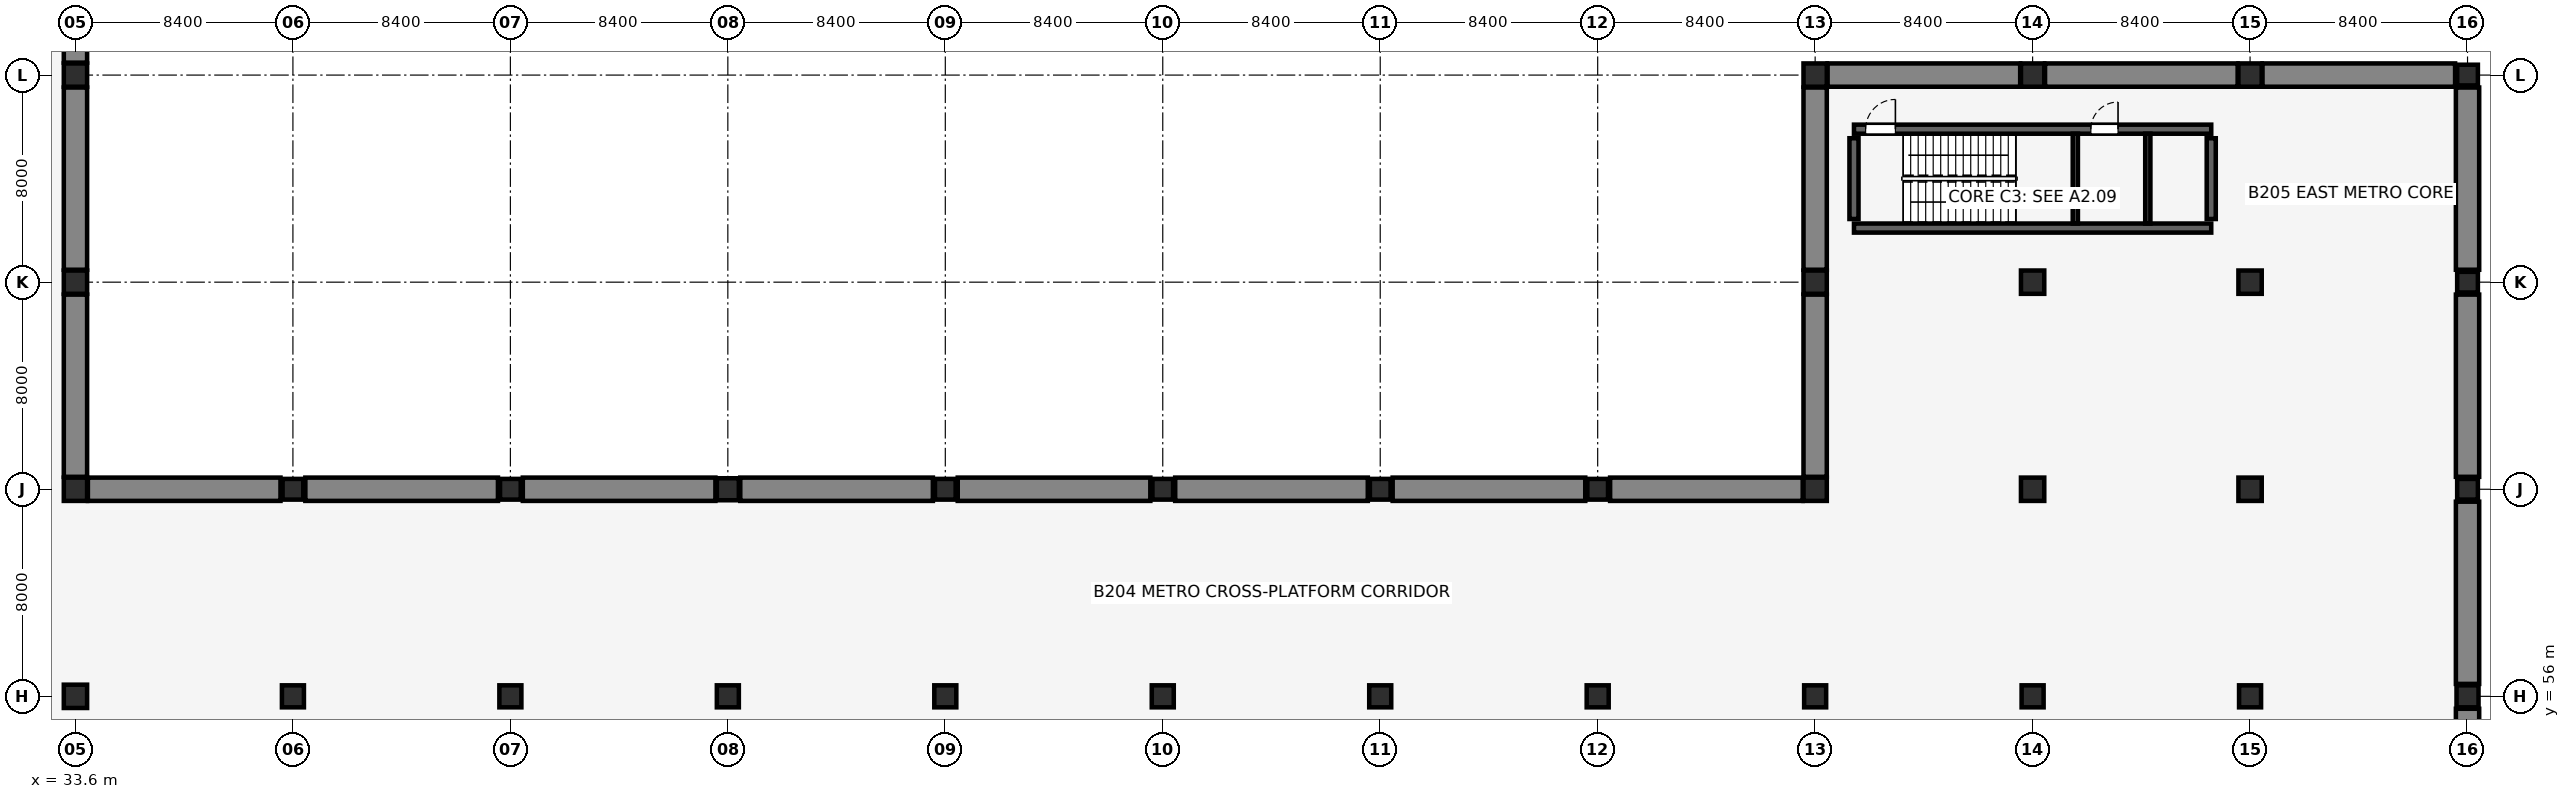
"""IFC4 building model, lengths in metres.
Left out: names, types, materials, properties, quantities, classifications, styles, units other than length and angle.
Written with IfcOpenShell. Run it as: python <this file> out.ifc"""

import sys

from ifc_helpers import new_model, si_unit, direction, frame, frame_2d, origin, origin_2d, place, context, subcontext, project, spatial, rectangle, extrude, element, fill, save


model = new_model("IFC4")
c1 = context("Model", 3, precision=1e-05, world=origin(), true_north=direction((0.0, 1.0)))
c2 = subcontext(c1, "Body", "Model", "MODEL_VIEW")
j1 = project(units=[si_unit("LENGTHUNIT", "METRE"), si_unit("PLANEANGLEUNIT", "RADIAN")], contexts=[c1])
p1 = place(None, origin())
s1 = spatial("IfcSite", under=j1, at=p1, CompositionType="ELEMENT")
p2 = place(p1, origin())
s2 = spatial("IfcBuilding", under=s1, at=p2, CompositionType="ELEMENT")
p3 = place(p2, frame((0.0, 0.0, -10.88)))
s3 = spatial("IfcBuildingStorey", under=s2, at=p3, CompositionType="ELEMENT", Elevation=-10.88)
for number, where, z_axis, x_axis in (
    (1, (33.6, 64.48, 0.0), (0.0, 0.0, 1.0), (0.0, 1.0, 0.0)),
    (2, (33.6, 72.48, 0.0), (0.0, 0.0, 1.0), (0.0, 1.0, 0.0)),
    (3, (33.6, 80.48, 0.0), (0.0, 0.0, 1.0), (0.0, 1.0, 0.0)),
):
    element("IfcWall", number, at=place(p3, frame(where, z_axis=z_axis, x_axis=x_axis)), inside=s3, PredefinedType="SHEAR", context=c2, shape_type="SweptSolid", body=[
        extrude(rectangle(XDim=7.04, YDim=0.9, at=frame_2d((3.52, 0.0))), origin(), (0.0, 0.0, 1.0), 5.04),
    ])
for number, where, z_axis, x_axis in (
    (4, (34.08, 64.0, 0.0), (0.0, 0.0, 1.0), (1.0, 0.0, 0.0)),
    (5, (42.48, 64.0, 0.0), (0.0, 0.0, 1.0), (1.0, 0.0, 0.0)),
):
    element("IfcWall", number, at=place(p3, frame(where, z_axis=z_axis, x_axis=x_axis)), inside=s3, PredefinedType="SHEAR", context=c2, shape_type="SweptSolid", body=[
        extrude(rectangle(XDim=7.44, YDim=0.9, at=frame_2d((3.72, 0.0))), origin(), (0.0, 0.0, 1.0), 5.04),
    ])
p4 = place(p3, frame((50.88, 64.0, 0.0), z_axis=(0.0, 0.0, 1.0), x_axis=(1.0, 0.0, 0.0)))
e6 = element("IfcWall", 6, at=p4, inside=s3, PredefinedType="SHEAR", context=c2, shape_type="SweptSolid", body=[
    extrude(rectangle(XDim=7.44, YDim=0.9, at=frame_2d((3.72, 0.0))), origin(), (0.0, 0.0, 1.0), 5.04),
])
p5 = place(p3, frame((59.28, 64.0, 0.0), z_axis=(0.0, 0.0, 1.0), x_axis=(1.0, 0.0, 0.0)))
e7 = element("IfcWall", 7, at=p5, inside=s3, PredefinedType="SHEAR", context=c2, shape_type="SweptSolid", body=[
    extrude(rectangle(XDim=7.44, YDim=0.9, at=frame_2d((3.72, 0.0))), origin(), (0.0, 0.0, 1.0), 5.04),
])
p6 = place(p3, frame((67.68, 64.0, 0.0), z_axis=(0.0, 0.0, 1.0), x_axis=(1.0, 0.0, 0.0)))
e8 = element("IfcWall", 8, at=p6, inside=s3, PredefinedType="SHEAR", context=c2, shape_type="SweptSolid", body=[
    extrude(rectangle(XDim=7.44, YDim=0.9, at=frame_2d((3.72, 0.0))), origin(), (0.0, 0.0, 1.0), 5.04),
])
for number, where, z_axis, x_axis in (
    (9, (76.08, 64.0, 0.0), (0.0, 0.0, 1.0), (1.0, 0.0, 0.0)),
    (10, (84.48, 64.0, 0.0), (0.0, 0.0, 1.0), (1.0, 0.0, 0.0)),
):
    element("IfcWall", number, at=place(p3, frame(where, z_axis=z_axis, x_axis=x_axis)), inside=s3, PredefinedType="SHEAR", context=c2, shape_type="SweptSolid", body=[
        extrude(rectangle(XDim=7.44, YDim=0.9, at=frame_2d((3.72, 0.0))), origin(), (0.0, 0.0, 1.0), 5.04),
    ])
p7 = place(p3, frame((92.88, 64.0, 0.0), z_axis=(0.0, 0.0, 1.0), x_axis=(1.0, 0.0, 0.0)))
e11 = element("IfcWall", 11, at=p7, inside=s3, PredefinedType="SHEAR", context=c2, shape_type="SweptSolid", body=[
    extrude(rectangle(XDim=7.44, YDim=0.9, at=frame_2d((3.72, 0.0))), origin(), (0.0, 0.0, 1.0), 5.04),
])
for number, where, z_axis, x_axis in (
    (12, (100.8, 64.48, 0.0), (0.0, 0.0, 1.0), (0.0, 1.0, 0.0)),
    (13, (100.8, 72.48, 0.0), (0.0, 0.0, 1.0), (0.0, 1.0, 0.0)),
):
    element("IfcWall", number, at=place(p3, frame(where, z_axis=z_axis, x_axis=x_axis)), inside=s3, PredefinedType="SHEAR", context=c2, shape_type="SweptSolid", body=[
        extrude(rectangle(XDim=7.04, YDim=0.9, at=frame_2d((3.52, 0.0))), origin(), (0.0, 0.0, 1.0), 5.04),
    ])
p8 = place(p3, frame((101.28, 80.0, 0.0), z_axis=(0.0, 0.0, 1.0), x_axis=(1.0, 0.0, 0.0)))
e14 = element("IfcWall", 14, at=p8, inside=s3, PredefinedType="SHEAR", context=c2, shape_type="SweptSolid", body=[
    extrude(rectangle(XDim=7.44, YDim=0.9, at=frame_2d((3.72, 0.0))), origin(), (0.0, 0.0, 1.0), 5.04),
])
p9 = place(p3, frame((109.68, 80.0, 0.0), z_axis=(0.0, 0.0, 1.0), x_axis=(1.0, 0.0, 0.0)))
e15 = element("IfcWall", 15, at=p9, inside=s3, PredefinedType="SHEAR", context=c2, shape_type="SweptSolid", body=[
    extrude(rectangle(XDim=7.44, YDim=0.9, at=frame_2d((3.72, 0.0))), origin(), (0.0, 0.0, 1.0), 5.04),
])
p10 = place(p3, frame((118.08, 80.0, 0.0), z_axis=(0.0, 0.0, 1.0), x_axis=(1.0, 0.0, 0.0)))
e16 = element("IfcWall", 16, at=p10, inside=s3, PredefinedType="SHEAR", context=c2, shape_type="SweptSolid", body=[
    extrude(rectangle(XDim=7.44, YDim=0.9, at=frame_2d((3.72, 0.0))), origin(), (0.0, 0.0, 1.0), 5.04),
])
for number, where, z_axis, x_axis in (
    (17, (126.0, 64.48, 0.0), (0.0, 0.0, 1.0), (0.0, 1.0, 0.0)),
    (18, (126.0, 72.48, 0.0), (0.0, 0.0, 1.0), (0.0, 1.0, 0.0)),
    (19, (126.0, 48.48, 0.0), (0.0, 0.0, 1.0), (0.0, 1.0, 0.0)),
    (20, (126.0, 56.48, 0.0), (0.0, 0.0, 1.0), (0.0, 1.0, 0.0)),
):
    element("IfcWall", number, at=place(p3, frame(where, z_axis=z_axis, x_axis=x_axis)), inside=s3, PredefinedType="SHEAR", context=c2, shape_type="SweptSolid", body=[
        extrude(rectangle(XDim=7.04, YDim=0.9, at=frame_2d((3.52, 0.0))), origin(), (0.0, 0.0, 1.0), 5.04),
    ])
p11 = place(p3, frame((102.3, 74.09, 0.0), z_axis=(0.0, 0.0, 1.0), x_axis=(1.0, 0.0, 0.0)))
e21 = element("IfcWall", 21, at=p11, inside=s3, PredefinedType="SHEAR", context=c2, shape_type="SweptSolid", body=[
    extrude(rectangle(XDim=13.8, YDim=0.35, at=frame_2d((6.9, 0.0))), origin(), (0.0, 0.0, 1.0), 5.04),
])
p12 = place(p3, frame((102.3, 77.91, 0.0), z_axis=(0.0, 0.0, 1.0), x_axis=(1.0, 0.0, 0.0)))
e22 = element("IfcWall", 22, at=p12, inside=s3, PredefinedType="SHEAR", context=c2, shape_type="SweptSolid", body=[
    extrude(rectangle(XDim=13.8, YDim=0.35, at=frame_2d((6.9, 0.0))), origin(), (0.0, 0.0, 1.0), 5.04),
])
p13 = place(p12, frame((0.45, 0.0, 0.0), z_axis=(0.0, 0.0, 1.0), x_axis=(1.0, 0.0, 0.0)))
e23 = element("IfcOpeningElement", 23, at=p13, cuts=e22, PredefinedType="OPENING", context=c2, shape_type="SweptSolid", body=[
    extrude(rectangle(XDim=1.15, YDim=2.15, at=frame_2d((0.575, 1.075))), frame((0.0, 0.185, 0.0), z_axis=(0.0, -1.0, 0.0), x_axis=(1.0, 0.0, 0.0)), (0.0, 0.0, 1.0), 0.37),
])
p14 = place(p12, frame((9.15, 0.0, 0.0), z_axis=(0.0, 0.0, 1.0), x_axis=(1.0, 0.0, 0.0)))
e24 = element("IfcOpeningElement", 24, at=p14, cuts=e22, PredefinedType="OPENING", context=c2, shape_type="SweptSolid", body=[
    extrude(rectangle(XDim=1.05, YDim=2.15, at=frame_2d((0.525, 1.075))), frame((0.0, 0.185, 0.0), z_axis=(0.0, -1.0, 0.0), x_axis=(1.0, 0.0, 0.0)), (0.0, 0.0, 1.0), 0.37),
])
for number, where, z_axis, x_axis in (
    (25, (102.3, 74.44, 0.0), (0.0, 0.0, 1.0), (0.0, 1.0, 0.0)),
    (26, (116.1, 74.44, 0.0), (0.0, 0.0, 1.0), (0.0, 1.0, 0.0)),
):
    element("IfcWall", number, at=place(p3, frame(where, z_axis=z_axis, x_axis=x_axis)), inside=s3, PredefinedType="SHEAR", context=c2, shape_type="SweptSolid", body=[
        extrude(rectangle(XDim=3.12, YDim=0.35, at=frame_2d((1.56, 0.0))), origin(), (0.0, 0.0, 1.0), 5.04),
    ])
for number, where, z_axis, x_axis in (
    (27, (33.6, 56.0, 0.0), (0.0, 0.0, 1.0), (1.0, 0.0, 0.0)),
    (28, (33.6, 64.0, 0.0), (0.0, 0.0, 1.0), (1.0, 0.0, 0.0)),
    (29, (33.6, 72.0, 0.0), (0.0, 0.0, 1.0), (1.0, 0.0, 0.0)),
    (30, (33.6, 80.0, 0.0), (0.0, 0.0, 1.0), (1.0, 0.0, 0.0)),
):
    element("IfcColumn", number, at=place(p3, frame(where, z_axis=z_axis, x_axis=x_axis)), inside=s3, PredefinedType="COLUMN", context=c2, shape_type="SweptSolid", body=[
        extrude(rectangle(XDim=0.9, YDim=0.9, at=origin_2d()), origin(), (0.0, 0.0, 1.0), 5.04),
    ])
p15 = place(p3, frame((42.0, 56.0, 0.0), z_axis=(0.0, 0.0, 1.0), x_axis=(1.0, 0.0, 0.0)))
e31 = element("IfcColumn", 31, at=p15, inside=s3, PredefinedType="COLUMN", context=c2, shape_type="SweptSolid", body=[
    extrude(rectangle(XDim=0.85, YDim=0.85, at=origin_2d()), origin(), (0.0, 0.0, 1.0), 5.04),
])
p16 = place(p3, frame((42.0, 64.0, 0.0), z_axis=(0.0, 0.0, 1.0), x_axis=(1.0, 0.0, 0.0)))
e32 = element("IfcColumn", 32, at=p16, inside=s3, PredefinedType="COLUMN", context=c2, shape_type="SweptSolid", body=[
    extrude(rectangle(XDim=0.8, YDim=0.8, at=origin_2d()), origin(), (0.0, 0.0, 1.0), 5.04),
])
p17 = place(p3, frame((50.4, 56.0, 0.0), z_axis=(0.0, 0.0, 1.0), x_axis=(1.0, 0.0, 0.0)))
e33 = element("IfcColumn", 33, at=p17, inside=s3, PredefinedType="COLUMN", context=c2, shape_type="SweptSolid", body=[
    extrude(rectangle(XDim=0.85, YDim=0.85, at=origin_2d()), origin(), (0.0, 0.0, 1.0), 5.04),
])
p18 = place(p3, frame((50.4, 64.0, 0.0), z_axis=(0.0, 0.0, 1.0), x_axis=(1.0, 0.0, 0.0)))
e34 = element("IfcColumn", 34, at=p18, inside=s3, PredefinedType="COLUMN", context=c2, shape_type="SweptSolid", body=[
    extrude(rectangle(XDim=0.8, YDim=0.8, at=origin_2d()), origin(), (0.0, 0.0, 1.0), 5.04),
])
for number, where, z_axis, x_axis in (
    (35, (58.8, 56.0, 0.0), (0.0, 0.0, 1.0), (1.0, 0.0, 0.0)),
    (36, (58.8, 64.0, 0.0), (0.0, 0.0, 1.0), (1.0, 0.0, 0.0)),
    (37, (67.2, 56.0, 0.0), (0.0, 0.0, 1.0), (1.0, 0.0, 0.0)),
):
    element("IfcColumn", number, at=place(p3, frame(where, z_axis=z_axis, x_axis=x_axis)), inside=s3, PredefinedType="COLUMN", context=c2, shape_type="SweptSolid", body=[
        extrude(rectangle(XDim=0.85, YDim=0.85, at=origin_2d()), origin(), (0.0, 0.0, 1.0), 5.04),
    ])
p19 = place(p3, frame((67.2, 64.0, 0.0), z_axis=(0.0, 0.0, 1.0), x_axis=(1.0, 0.0, 0.0)))
e38 = element("IfcColumn", 38, at=p19, inside=s3, PredefinedType="COLUMN", context=c2, shape_type="SweptSolid", body=[
    extrude(rectangle(XDim=0.8, YDim=0.8, at=origin_2d()), origin(), (0.0, 0.0, 1.0), 5.04),
])
p20 = place(p3, frame((75.6, 56.0, 0.0), z_axis=(0.0, 0.0, 1.0), x_axis=(1.0, 0.0, 0.0)))
e39 = element("IfcColumn", 39, at=p20, inside=s3, PredefinedType="COLUMN", context=c2, shape_type="SweptSolid", body=[
    extrude(rectangle(XDim=0.85, YDim=0.85, at=origin_2d()), origin(), (0.0, 0.0, 1.0), 5.04),
])
p21 = place(p3, frame((75.6, 64.0, 0.0), z_axis=(0.0, 0.0, 1.0), x_axis=(1.0, 0.0, 0.0)))
e40 = element("IfcColumn", 40, at=p21, inside=s3, PredefinedType="COLUMN", context=c2, shape_type="SweptSolid", body=[
    extrude(rectangle(XDim=0.8, YDim=0.8, at=origin_2d()), origin(), (0.0, 0.0, 1.0), 5.04),
])
p22 = place(p3, frame((84.0, 56.0, 0.0), z_axis=(0.0, 0.0, 1.0), x_axis=(1.0, 0.0, 0.0)))
e41 = element("IfcColumn", 41, at=p22, inside=s3, PredefinedType="COLUMN", context=c2, shape_type="SweptSolid", body=[
    extrude(rectangle(XDim=0.85, YDim=0.85, at=origin_2d()), origin(), (0.0, 0.0, 1.0), 5.04),
])
p23 = place(p3, frame((84.0, 64.0, 0.0), z_axis=(0.0, 0.0, 1.0), x_axis=(1.0, 0.0, 0.0)))
e42 = element("IfcColumn", 42, at=p23, inside=s3, PredefinedType="COLUMN", context=c2, shape_type="SweptSolid", body=[
    extrude(rectangle(XDim=0.8, YDim=0.8, at=origin_2d()), origin(), (0.0, 0.0, 1.0), 5.04),
])
p24 = place(p3, frame((92.4, 56.0, 0.0), z_axis=(0.0, 0.0, 1.0), x_axis=(1.0, 0.0, 0.0)))
e43 = element("IfcColumn", 43, at=p24, inside=s3, PredefinedType="COLUMN", context=c2, shape_type="SweptSolid", body=[
    extrude(rectangle(XDim=0.85, YDim=0.85, at=origin_2d()), origin(), (0.0, 0.0, 1.0), 5.04),
])
p25 = place(p3, frame((92.4, 64.0, 0.0), z_axis=(0.0, 0.0, 1.0), x_axis=(1.0, 0.0, 0.0)))
e44 = element("IfcColumn", 44, at=p25, inside=s3, PredefinedType="COLUMN", context=c2, shape_type="SweptSolid", body=[
    extrude(rectangle(XDim=0.8, YDim=0.8, at=origin_2d()), origin(), (0.0, 0.0, 1.0), 5.04),
])
p26 = place(p3, frame((100.8, 56.0, 0.0), z_axis=(0.0, 0.0, 1.0), x_axis=(1.0, 0.0, 0.0)))
e45 = element("IfcColumn", 45, at=p26, inside=s3, PredefinedType="COLUMN", context=c2, shape_type="SweptSolid", body=[
    extrude(rectangle(XDim=0.85, YDim=0.85, at=origin_2d()), origin(), (0.0, 0.0, 1.0), 5.04),
])
for number, where, z_axis, x_axis in (
    (46, (100.8, 64.0, 0.0), (0.0, 0.0, 1.0), (1.0, 0.0, 0.0)),
    (47, (100.8, 72.0, 0.0), (0.0, 0.0, 1.0), (1.0, 0.0, 0.0)),
    (48, (100.8, 80.0, 0.0), (0.0, 0.0, 1.0), (1.0, 0.0, 0.0)),
):
    element("IfcColumn", number, at=place(p3, frame(where, z_axis=z_axis, x_axis=x_axis)), inside=s3, PredefinedType="COLUMN", context=c2, shape_type="SweptSolid", body=[
        extrude(rectangle(XDim=0.9, YDim=0.9, at=origin_2d()), origin(), (0.0, 0.0, 1.0), 5.04),
    ])
p27 = place(p3, frame((109.2, 56.0, 0.0), z_axis=(0.0, 0.0, 1.0), x_axis=(1.0, 0.0, 0.0)))
e49 = element("IfcColumn", 49, at=p27, inside=s3, PredefinedType="COLUMN", context=c2, shape_type="SweptSolid", body=[
    extrude(rectangle(XDim=0.85, YDim=0.85, at=origin_2d()), origin(), (0.0, 0.0, 1.0), 5.04),
])
for number, where, z_axis, x_axis in (
    (50, (109.2, 64.0, 0.0), (0.0, 0.0, 1.0), (1.0, 0.0, 0.0)),
    (51, (109.2, 72.0, 0.0), (0.0, 0.0, 1.0), (1.0, 0.0, 0.0)),
    (52, (109.2, 80.0, 0.0), (0.0, 0.0, 1.0), (1.0, 0.0, 0.0)),
):
    element("IfcColumn", number, at=place(p3, frame(where, z_axis=z_axis, x_axis=x_axis)), inside=s3, PredefinedType="COLUMN", context=c2, shape_type="SweptSolid", body=[
        extrude(rectangle(XDim=0.9, YDim=0.9, at=origin_2d()), origin(), (0.0, 0.0, 1.0), 5.04),
    ])
p28 = place(p3, frame((117.6, 56.0, 0.0), z_axis=(0.0, 0.0, 1.0), x_axis=(1.0, 0.0, 0.0)))
e53 = element("IfcColumn", 53, at=p28, inside=s3, PredefinedType="COLUMN", context=c2, shape_type="SweptSolid", body=[
    extrude(rectangle(XDim=0.85, YDim=0.85, at=origin_2d()), origin(), (0.0, 0.0, 1.0), 5.04),
])
for number, where, z_axis, x_axis in (
    (54, (117.6, 64.0, 0.0), (0.0, 0.0, 1.0), (1.0, 0.0, 0.0)),
    (55, (117.6, 72.0, 0.0), (0.0, 0.0, 1.0), (1.0, 0.0, 0.0)),
    (56, (117.6, 80.0, 0.0), (0.0, 0.0, 1.0), (1.0, 0.0, 0.0)),
):
    element("IfcColumn", number, at=place(p3, frame(where, z_axis=z_axis, x_axis=x_axis)), inside=s3, PredefinedType="COLUMN", context=c2, shape_type="SweptSolid", body=[
        extrude(rectangle(XDim=0.9, YDim=0.9, at=origin_2d()), origin(), (0.0, 0.0, 1.0), 5.04),
    ])
p29 = place(p3, frame((126.0, 56.0, 0.0), z_axis=(0.0, 0.0, 1.0), x_axis=(1.0, 0.0, 0.0)))
e57 = element("IfcColumn", 57, at=p29, inside=s3, PredefinedType="COLUMN", context=c2, shape_type="SweptSolid", body=[
    extrude(rectangle(XDim=0.85, YDim=0.85, at=origin_2d()), origin(), (0.0, 0.0, 1.0), 5.04),
])
for number, where, z_axis, x_axis in (
    (58, (126.0, 64.0, 0.0), (0.0, 0.0, 1.0), (1.0, 0.0, 0.0)),
    (59, (126.0, 72.0, 0.0), (0.0, 0.0, 1.0), (1.0, 0.0, 0.0)),
    (60, (126.0, 80.0, 0.0), (0.0, 0.0, 1.0), (1.0, 0.0, 0.0)),
):
    element("IfcColumn", number, at=place(p3, frame(where, z_axis=z_axis, x_axis=x_axis)), inside=s3, PredefinedType="COLUMN", context=c2, shape_type="SweptSolid", body=[
        extrude(rectangle(XDim=0.8, YDim=0.8, at=origin_2d()), origin(), (0.0, 0.0, 1.0), 5.04),
    ])
for number, where, z_axis, x_axis in (
    (61, (110.85, 74.265, 0.0), (0.0, 0.0, 1.0), (0.0, 1.0, 0.0)),
    (62, (113.65, 74.265, 0.0), (0.0, 0.0, 1.0), (0.0, 1.0, 0.0)),
):
    element("IfcWall", number, at=place(p3, frame(where, z_axis=z_axis, x_axis=x_axis)), inside=s3, PredefinedType="SHEAR", context=c2, shape_type="SweptSolid", body=[
        extrude(rectangle(XDim=3.47, YDim=0.2, at=frame_2d((1.735, 0.0))), origin(), (0.0, 0.0, 1.0), 5.04),
    ])
p30 = place(p13, origin())
e63 = element("IfcDoor", 63, at=p30, inside=s3, OperationType="SINGLE_SWING_RIGHT", PredefinedType="DOOR", context=c2, shape_type="SweptSolid", body=[
    extrude(rectangle(XDim=1.15, YDim=2.15, at=frame_2d((0.575, 1.075))), frame((0.0, 0.025, 0.0), z_axis=(0.0, -1.0, 0.0), x_axis=(1.0, 0.0, 0.0)), (0.0, 0.0, 1.0), 0.05),
])
fill(e23, e63)
p31 = place(p14, origin())
e64 = element("IfcDoor", 64, at=p31, inside=s3, OperationType="SINGLE_SWING_RIGHT", PredefinedType="DOOR", context=c2, shape_type="SweptSolid", body=[
    extrude(rectangle(XDim=1.05, YDim=2.15, at=frame_2d((0.525, 1.075))), frame((0.0, 0.025, 0.0), z_axis=(0.0, -1.0, 0.0), x_axis=(1.0, 0.0, 0.0)), (0.0, 0.0, 1.0), 0.05),
])
fill(e24, e64)
save(model, sys.argv[1])
